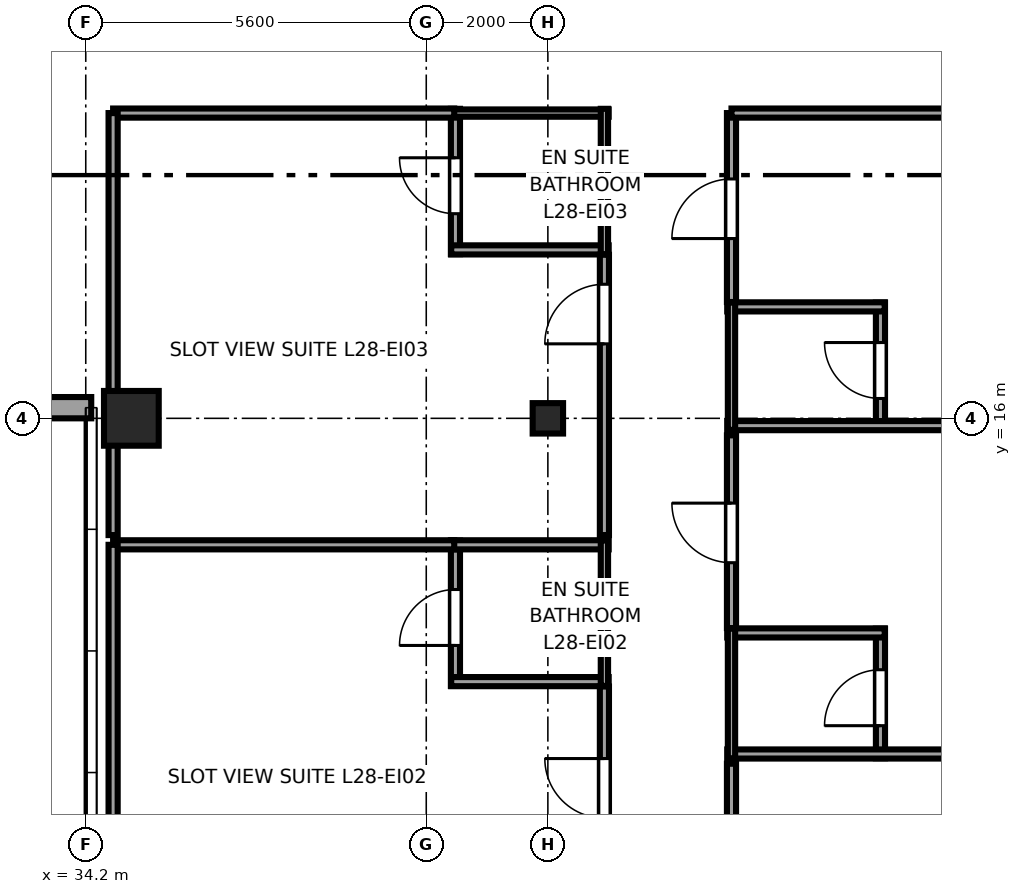
"""IFC4 building model, lengths in metres.
Left out: names, types, materials, properties, quantities, classifications, styles, units other than length and angle.
Written with IfcOpenShell. Run it as: python <this file> out.ifc"""

import sys

from ifc_helpers import new_model, si_unit, direction, frame, frame_2d, origin, origin_2d, place, context, subcontext, project, spatial, rectangle, i_section, extrude, source, transform, mapped, element, fill, save


model = new_model("IFC4")
c1 = context("Model", 3, precision=1e-05, world=origin(), true_north=direction((0.0, 1.0)))
c2 = subcontext(c1, "Body", "Model", "MODEL_VIEW")
j1 = project(units=[si_unit("LENGTHUNIT", "METRE"), si_unit("PLANEANGLEUNIT", "RADIAN")], contexts=[c1])
p1 = place(None, origin())
s1 = spatial("IfcSite", under=j1, at=p1, CompositionType="ELEMENT")
p2 = place(p1, origin())
s2 = spatial("IfcBuilding", under=s1, at=p2, CompositionType="ELEMENT")
p3 = place(p2, frame((0.0, 0.0, 111.55)))
s3 = spatial("IfcBuildingStorey", under=s2, at=p3, CompositionType="ELEMENT", Elevation=111.55)
m1 = source(origin(), c2, "Body", "SweptSolid", [
    extrude(rectangle(XDim=0.9, YDim=0.9, at=origin_2d()), origin(), (0.0, 0.0, 1.0), 3.55),
])
p4 = place(p3, frame((34.95, 16.0, 0.0), z_axis=(0.0, 0.0, 1.0), x_axis=(1.0, 0.0, 0.0)))
e1 = element("IfcColumn", 1, at=p4, inside=s3, PredefinedType="COLUMN", context=c2, shape_type="MappedRepresentation", body=[
    mapped(m1, transform((0.0, 0.0, 0.0), x_axis=(1.0, 0.0, 0.0), y_axis=(0.0, 1.0, 0.0), z_axis=(0.0, 0.0, 1.0), scale=1.0)),
])
m2 = source(origin(), c2, "Body", "SweptSolid", [
    extrude(i_section(OverallWidth=0.5, OverallDepth=0.5, WebThickness=0.022, FlangeThickness=0.034, at=origin_2d()), origin(), (0.0, 0.0, 1.0), 3.55),
])
p5 = place(p3, frame((41.8, 16.0, 0.0), z_axis=(0.0, 0.0, 1.0), x_axis=(1.0, 0.0, 0.0)))
e2 = element("IfcColumn", 2, at=p5, inside=s3, PredefinedType="COLUMN", context=c2, shape_type="MappedRepresentation", body=[
    mapped(m2, transform((0.0, 0.0, 0.0), x_axis=(1.0, 0.0, 0.0), y_axis=(0.0, 1.0, 0.0), z_axis=(0.0, 0.0, 1.0), scale=1.0)),
])
p6 = place(p3, frame((22.71, 16.175, 0.0), z_axis=(0.0, 0.0, 1.0), x_axis=(1.0, 0.0, 0.0)))
e3 = element("IfcWall", 3, at=p6, inside=s3, PredefinedType="SOLIDWALL", context=c2, shape_type="SweptSolid", body=[
    extrude(rectangle(XDim=11.58, YDim=0.35, at=frame_2d((5.79, 0.0))), origin(), (0.0, 0.0, 1.0), 2.748),
])
p7 = place(p6, frame((2.22, 0.0, 0.68)))
e4 = element("IfcOpeningElement", 4, at=p7, cuts=e3, PredefinedType="OPENING", context=c2, shape_type="SweptSolid", body=[
    extrude(rectangle(XDim=1.95, YDim=1.82, at=frame_2d((0.975, 0.91))), frame((0.0, 0.185, 0.0), z_axis=(0.0, -1.0, 0.0), x_axis=(1.0, 0.0, 0.0)), (0.0, 0.0, 1.0), 0.37),
])
p8 = place(p6, frame((7.41, 0.0, 0.68)))
e5 = element("IfcOpeningElement", 5, at=p8, cuts=e3, PredefinedType="OPENING", context=c2, shape_type="SweptSolid", body=[
    extrude(rectangle(XDim=1.95, YDim=1.82, at=frame_2d((0.975, 0.91))), frame((0.0, 0.185, 0.0), z_axis=(0.0, -1.0, 0.0), x_axis=(1.0, 0.0, 0.0)), (0.0, 0.0, 1.0), 0.37),
])
p9 = place(p3, frame((40.28, 11.6, 0.0), z_axis=(0.0, 0.0, 1.0), x_axis=(0.0, 1.0, 0.0)))
e6 = element("IfcWall", 6, at=p9, inside=s3, PredefinedType="PARTITIONING", context=c2, shape_type="SweptSolid", body=[
    extrude(rectangle(XDim=2.39, YDim=0.15, at=frame_2d((1.195, 0.0))), origin(), (0.0, 0.0, 1.0), 3.37),
])
p10 = place(p9, frame((0.665, 0.0, 0.0)))
e7 = element("IfcOpeningElement", 7, at=p10, cuts=e6, PredefinedType="OPENING", context=c2, shape_type="SweptSolid", body=[
    extrude(rectangle(XDim=0.92, YDim=2.01, at=frame_2d((0.46, 1.005))), frame((0.0, 0.085, 0.0), z_axis=(0.0, -1.0, 0.0), x_axis=(1.0, 0.0, 0.0)), (0.0, 0.0, 1.0), 0.17),
])
for number, where, z_axis, x_axis in (
    (8, (40.21, 11.67, 0.0), (0.0, 0.0, 1.0), (1.0, 0.0, 0.0)),
    (9, (40.21, 13.92, 0.0), (0.0, 0.0, 1.0), (1.0, 0.0, 0.0)),
):
    element("IfcWall", number, at=place(p3, frame(where, z_axis=z_axis, x_axis=x_axis)), inside=s3, PredefinedType="PARTITIONING", context=c2, shape_type="SweptSolid", body=[
        extrude(rectangle(XDim=2.59, YDim=0.15, at=frame_2d((1.295, 0.0))), origin(), (0.0, 0.0, 1.0), 3.37),
    ])
p11 = place(p3, frame((42.73, 11.6, 0.0), z_axis=(0.0, 0.0, 1.0), x_axis=(0.0, 1.0, 0.0)))
e10 = element("IfcWall", 10, at=p11, inside=s3, PredefinedType="PLUMBINGWALL", context=c2, shape_type="SweptSolid", body=[
    extrude(rectangle(XDim=2.39, YDim=0.12, at=frame_2d((1.195, 0.0))), origin(), (0.0, 0.0, 1.0), 3.37),
])
p12 = place(p3, frame((40.28, 18.7, 0.0), z_axis=(0.0, 0.0, 1.0), x_axis=(0.0, 1.0, 0.0)))
e11 = element("IfcWall", 11, at=p12, inside=s3, PredefinedType="PARTITIONING", context=c2, shape_type="SweptSolid", body=[
    extrude(rectangle(XDim=2.39, YDim=0.15, at=frame_2d((1.195, 0.0))), origin(), (0.0, 0.0, 1.0), 3.37),
])
p13 = place(p12, frame((0.665, 0.0, 0.0)))
e12 = element("IfcOpeningElement", 12, at=p13, cuts=e11, PredefinedType="OPENING", context=c2, shape_type="SweptSolid", body=[
    extrude(rectangle(XDim=0.92, YDim=2.01, at=frame_2d((0.46, 1.005))), frame((0.0, 0.085, 0.0), z_axis=(0.0, -1.0, 0.0), x_axis=(1.0, 0.0, 0.0)), (0.0, 0.0, 1.0), 0.17),
])
p14 = place(p3, frame((40.21, 18.77, 0.0), z_axis=(0.0, 0.0, 1.0), x_axis=(1.0, 0.0, 0.0)))
e13 = element("IfcWall", 13, at=p14, inside=s3, PredefinedType="PARTITIONING", context=c2, shape_type="SweptSolid", body=[
    extrude(rectangle(XDim=2.59, YDim=0.15, at=frame_2d((1.295, 0.0))), origin(), (0.0, 0.0, 1.0), 3.37),
])
p15 = place(p3, frame((40.21, 21.02, 0.0), z_axis=(0.0, 0.0, 1.0), x_axis=(1.0, 0.0, 0.0)))
e14 = element("IfcWall", 14, at=p15, inside=s3, PredefinedType="PLUMBINGWALL", context=c2, shape_type="SweptSolid", body=[
    extrude(rectangle(XDim=2.59, YDim=0.12, at=frame_2d((1.295, 0.0))), origin(), (0.0, 0.0, 1.0), 3.37),
])
p16 = place(p3, frame((42.73, 18.7, 0.0), z_axis=(0.0, 0.0, 1.0), x_axis=(0.0, 1.0, 0.0)))
e15 = element("IfcWall", 15, at=p16, inside=s3, PredefinedType="PLUMBINGWALL", context=c2, shape_type="SweptSolid", body=[
    extrude(rectangle(XDim=2.39, YDim=0.12, at=frame_2d((1.195, 0.0))), origin(), (0.0, 0.0, 1.0), 3.37),
])
p17 = place(p3, frame((47.27, 10.41, 0.0), z_axis=(0.0, 0.0, 1.0), x_axis=(0.0, 1.0, 0.0)))
e16 = element("IfcWall", 16, at=p17, inside=s3, PredefinedType="PARTITIONING", context=c2, shape_type="SweptSolid", body=[
    extrude(rectangle(XDim=2.131, YDim=0.15, at=frame_2d((1.065, 0.0))), origin(), (0.0, 0.0, 1.0), 3.37),
])
p18 = place(p17, frame((0.535, 0.0, 0.0)))
e17 = element("IfcOpeningElement", 17, at=p18, cuts=e16, PredefinedType="OPENING", context=c2, shape_type="SweptSolid", body=[
    extrude(rectangle(XDim=0.92, YDim=2.01, at=frame_2d((0.46, 1.005))), frame((0.0, 0.085, 0.0), z_axis=(0.0, -1.0, 0.0), x_axis=(1.0, 0.0, 0.0)), (0.0, 0.0, 1.0), 0.17),
])
p19 = place(p3, frame((44.75, 10.48, 0.0), z_axis=(0.0, 0.0, 1.0), x_axis=(1.0, 0.0, 0.0)))
e18 = element("IfcWall", 18, at=p19, inside=s3, PredefinedType="PARTITIONING", context=c2, shape_type="SweptSolid", body=[
    extrude(rectangle(XDim=11.845, YDim=0.15, at=frame_2d((5.922, 0.0))), origin(), (0.0, 0.0, 1.0), 3.37),
])
p20 = place(p3, frame((44.75, 12.471, 0.0), z_axis=(0.0, 0.0, 1.0), x_axis=(1.0, 0.0, 0.0)))
e19 = element("IfcWall", 19, at=p20, inside=s3, PredefinedType="PARTITIONING", context=c2, shape_type="SweptSolid", body=[
    extrude(rectangle(XDim=2.59, YDim=0.15, at=frame_2d((1.295, 0.0))), origin(), (0.0, 0.0, 1.0), 3.37),
])
p21 = place(p3, frame((44.82, 10.41, 0.0), z_axis=(0.0, 0.0, 1.0), x_axis=(0.0, 1.0, 0.0)))
e20 = element("IfcWall", 20, at=p21, inside=s3, PredefinedType="PLUMBINGWALL", context=c2, shape_type="SweptSolid", body=[
    extrude(rectangle(XDim=2.131, YDim=0.12, at=frame_2d((1.065, 0.0))), origin(), (0.0, 0.0, 1.0), 3.37),
])
p22 = place(p3, frame((47.27, 15.81, 0.0), z_axis=(0.0, 0.0, 1.0), x_axis=(0.0, 1.0, 0.0)))
e21 = element("IfcWall", 21, at=p22, inside=s3, PredefinedType="PARTITIONING", context=c2, shape_type="SweptSolid", body=[
    extrude(rectangle(XDim=2.093, YDim=0.15, at=frame_2d((1.046, 0.0))), origin(), (0.0, 0.0, 1.0), 3.37),
])
p23 = place(p22, frame((0.517, 0.0, 0.0)))
e22 = element("IfcOpeningElement", 22, at=p23, cuts=e21, PredefinedType="OPENING", context=c2, shape_type="SweptSolid", body=[
    extrude(rectangle(XDim=0.92, YDim=2.01, at=frame_2d((0.46, 1.005))), frame((0.0, 0.085, 0.0), z_axis=(0.0, -1.0, 0.0), x_axis=(1.0, 0.0, 0.0)), (0.0, 0.0, 1.0), 0.17),
])
p24 = place(p3, frame((44.75, 15.88, 0.0), z_axis=(0.0, 0.0, 1.0), x_axis=(1.0, 0.0, 0.0)))
e23 = element("IfcWall", 23, at=p24, inside=s3, PredefinedType="PARTITIONING", context=c2, shape_type="SweptSolid", body=[
    extrude(rectangle(XDim=11.845, YDim=0.15, at=frame_2d((5.922, 0.0))), origin(), (0.0, 0.0, 1.0), 2.748),
])
p25 = place(p3, frame((44.75, 17.833, 0.0), z_axis=(0.0, 0.0, 1.0), x_axis=(1.0, 0.0, 0.0)))
e24 = element("IfcWall", 24, at=p25, inside=s3, PredefinedType="PARTITIONING", context=c2, shape_type="SweptSolid", body=[
    extrude(rectangle(XDim=2.59, YDim=0.15, at=frame_2d((1.295, 0.0))), origin(), (0.0, 0.0, 1.0), 3.37),
])
p26 = place(p3, frame((44.82, 15.81, 0.0), z_axis=(0.0, 0.0, 1.0), x_axis=(0.0, 1.0, 0.0)))
e25 = element("IfcWall", 25, at=p26, inside=s3, PredefinedType="PLUMBINGWALL", context=c2, shape_type="SweptSolid", body=[
    extrude(rectangle(XDim=2.093, YDim=0.12, at=frame_2d((1.046, 0.0))), origin(), (0.0, 0.0, 1.0), 3.37),
])
p27 = place(p3, frame((42.73, 7.08, 0.0), z_axis=(0.0, 0.0, 1.0), x_axis=(0.0, 1.0, 0.0)))
e26 = element("IfcWall", 26, at=p27, inside=s3, PredefinedType="PARTITIONING", context=c2, shape_type="SweptSolid", body=[
    extrude(rectangle(XDim=4.51, YDim=0.15, at=frame_2d((2.255, 0.0))), origin(), (0.0, 0.0, 1.0), 3.37),
])
p28 = place(p27, frame((2.345, 0.0, 0.0)))
e27 = element("IfcOpeningElement", 27, at=p28, cuts=e26, PredefinedType="OPENING", context=c2, shape_type="SweptSolid", body=[
    extrude(rectangle(XDim=0.98, YDim=2.12, at=frame_2d((0.49, 1.06))), frame((0.0, 0.085, 0.0), z_axis=(0.0, -1.0, 0.0), x_axis=(1.0, 0.0, 0.0)), (0.0, 0.0, 1.0), 0.17),
])
p29 = place(p3, frame((34.65, 13.92, 0.0), z_axis=(0.0, 0.0, 1.0), x_axis=(1.0, 0.0, 0.0)))
e28 = element("IfcWall", 28, at=p29, inside=s3, PredefinedType="PARTITIONING", context=c2, shape_type="SweptSolid", body=[
    extrude(rectangle(XDim=5.61, YDim=0.15, at=frame_2d((2.805, 0.0))), origin(), (0.0, 0.0, 1.0), 3.37),
])
p30 = place(p3, frame((34.65, 7.08, 0.0), z_axis=(0.0, 0.0, 1.0), x_axis=(0.0, 1.0, 0.0)))
e29 = element("IfcWall", 29, at=p30, inside=s3, PredefinedType="PARTITIONING", context=c2, shape_type="SweptSolid", body=[
    extrude(rectangle(XDim=6.84, YDim=0.15, at=frame_2d((3.42, 0.0))), origin(), (0.0, 0.0, 1.0), 3.37),
])
p31 = place(p3, frame((42.73, 14.08, 0.0), z_axis=(0.0, 0.0, 1.0), x_axis=(0.0, 1.0, 0.0)))
e30 = element("IfcWall", 30, at=p31, inside=s3, PredefinedType="PARTITIONING", context=c2, shape_type="SweptSolid", body=[
    extrude(rectangle(XDim=4.61, YDim=0.15, at=frame_2d((2.305, 0.0))), origin(), (0.0, 0.0, 1.0), 3.37),
])
p32 = place(p31, frame((3.145, 0.0, 0.0)))
e31 = element("IfcOpeningElement", 31, at=p32, cuts=e30, PredefinedType="OPENING", context=c2, shape_type="SweptSolid", body=[
    extrude(rectangle(XDim=0.98, YDim=2.12, at=frame_2d((0.49, 1.06))), frame((0.0, 0.085, 0.0), z_axis=(0.0, -1.0, 0.0), x_axis=(1.0, 0.0, 0.0)), (0.0, 0.0, 1.0), 0.17),
])
p33 = place(p3, frame((34.65, 21.02, 0.0), z_axis=(0.0, 0.0, 1.0), x_axis=(1.0, 0.0, 0.0)))
e32 = element("IfcWall", 32, at=p33, inside=s3, PredefinedType="PARTITIONING", context=c2, shape_type="SweptSolid", body=[
    extrude(rectangle(XDim=5.61, YDim=0.15, at=frame_2d((2.805, 0.0))), origin(), (0.0, 0.0, 1.0), 3.37),
])
p34 = place(p3, frame((34.65, 14.08, 0.0), z_axis=(0.0, 0.0, 1.0), x_axis=(0.0, 1.0, 0.0)))
e33 = element("IfcWall", 33, at=p34, inside=s3, PredefinedType="PARTITIONING", context=c2, shape_type="SweptSolid", body=[
    extrude(rectangle(XDim=6.94, YDim=0.15, at=frame_2d((3.47, 0.0))), origin(), (0.0, 0.0, 1.0), 3.37),
])
p35 = place(p3, frame((44.82, 7.151, 0.0), z_axis=(0.0, 0.0, 1.0), x_axis=(0.0, 1.0, 0.0)))
e34 = element("IfcWall", 34, at=p35, inside=s3, PredefinedType="PARTITIONING", context=c2, shape_type="SweptSolid", body=[
    extrude(rectangle(XDim=3.169, YDim=0.15, at=frame_2d((1.584, 0.0))), origin(), (0.0, 0.0, 1.0), 3.37),
])
p36 = place(p35, frame((1.074, 0.0, 0.0)))
e35 = element("IfcOpeningElement", 35, at=p36, cuts=e34, PredefinedType="OPENING", context=c2, shape_type="SweptSolid", body=[
    extrude(rectangle(XDim=0.98, YDim=2.12, at=frame_2d((0.49, 1.06))), frame((0.0, 0.085, 0.0), z_axis=(0.0, -1.0, 0.0), x_axis=(1.0, 0.0, 0.0)), (0.0, 0.0, 1.0), 0.17),
])
p37 = place(p3, frame((44.82, 12.551, 0.0), z_axis=(0.0, 0.0, 1.0), x_axis=(0.0, 1.0, 0.0)))
e36 = element("IfcWall", 36, at=p37, inside=s3, PredefinedType="PARTITIONING", context=c2, shape_type="SweptSolid", body=[
    extrude(rectangle(XDim=3.169, YDim=0.15, at=frame_2d((1.584, 0.0))), origin(), (0.0, 0.0, 1.0), 3.37),
])
p38 = place(p37, frame((1.074, 0.0, 0.0)))
e37 = element("IfcOpeningElement", 37, at=p38, cuts=e36, PredefinedType="OPENING", context=c2, shape_type="SweptSolid", body=[
    extrude(rectangle(XDim=0.98, YDim=2.12, at=frame_2d((0.49, 1.06))), frame((0.0, 0.085, 0.0), z_axis=(0.0, -1.0, 0.0), x_axis=(1.0, 0.0, 0.0)), (0.0, 0.0, 1.0), 0.17),
])
p39 = place(p3, frame((44.82, 17.913, 0.0), z_axis=(0.0, 0.0, 1.0), x_axis=(0.0, 1.0, 0.0)))
e38 = element("IfcWall", 38, at=p39, inside=s3, PredefinedType="PARTITIONING", context=c2, shape_type="SweptSolid", body=[
    extrude(rectangle(XDim=3.107, YDim=0.15, at=frame_2d((1.553, 0.0))), origin(), (0.0, 0.0, 1.0), 3.37),
])
p40 = place(p39, frame((1.043, 0.0, 0.0)))
e39 = element("IfcOpeningElement", 39, at=p40, cuts=e38, PredefinedType="OPENING", context=c2, shape_type="SweptSolid", body=[
    extrude(rectangle(XDim=0.98, YDim=2.12, at=frame_2d((0.49, 1.06))), frame((0.0, 0.085, 0.0), z_axis=(0.0, -1.0, 0.0), x_axis=(1.0, 0.0, 0.0)), (0.0, 0.0, 1.0), 0.17),
])
p41 = place(p3, frame((44.82, 21.02, 0.0), z_axis=(0.0, 0.0, 1.0), x_axis=(1.0, 0.0, 0.0)))
e40 = element("IfcWall", 40, at=p41, inside=s3, PredefinedType="PARTITIONING", context=c2, shape_type="SweptSolid", body=[
    extrude(rectangle(XDim=11.775, YDim=0.15, at=frame_2d((5.887, 0.0))), origin(), (0.0, 0.0, 1.0), 3.37),
])
m3 = source(origin(), c2, "Body", "SweptSolid", [
    extrude(rectangle(XDim=0.92, YDim=2.01, at=frame_2d((0.46, 1.005))), frame((0.0, 0.025, 0.0), z_axis=(0.0, -1.0, 0.0), x_axis=(1.0, 0.0, 0.0)), (0.0, 0.0, 1.0), 0.05),
])
p42 = place(p10, origin())
e41 = element("IfcDoor", 41, at=p42, inside=s3, OperationType="SINGLE_SWING_LEFT", PredefinedType="DOOR", context=c2, shape_type="MappedRepresentation", body=[
    mapped(m3, transform((0.0, 0.0, 0.0), x_axis=(1.0, 0.0, 0.0), y_axis=(0.0, 1.0, 0.0), z_axis=(0.0, 0.0, 1.0), scale=1.0)),
])
fill(e7, e41)
p43 = place(p13, origin())
e42 = element("IfcDoor", 42, at=p43, inside=s3, OperationType="SINGLE_SWING_RIGHT", PredefinedType="DOOR", context=c2, shape_type="MappedRepresentation", body=[
    mapped(m3, transform((0.0, 0.0, 0.0), x_axis=(1.0, 0.0, 0.0), y_axis=(0.0, 1.0, 0.0), z_axis=(0.0, 0.0, 1.0), scale=1.0)),
])
fill(e12, e42)
p44 = place(p18, origin())
e43 = element("IfcDoor", 43, at=p44, inside=s3, OperationType="SINGLE_SWING_LEFT", PredefinedType="DOOR", context=c2, shape_type="MappedRepresentation", body=[
    mapped(m3, transform((0.0, 0.0, 0.0), x_axis=(1.0, 0.0, 0.0), y_axis=(0.0, 1.0, 0.0), z_axis=(0.0, 0.0, 1.0), scale=1.0)),
])
fill(e17, e43)
p45 = place(p23, origin())
e44 = element("IfcDoor", 44, at=p45, inside=s3, OperationType="SINGLE_SWING_RIGHT", PredefinedType="DOOR", context=c2, shape_type="MappedRepresentation", body=[
    mapped(m3, transform((0.0, 0.0, 0.0), x_axis=(1.0, 0.0, 0.0), y_axis=(0.0, 1.0, 0.0), z_axis=(0.0, 0.0, 1.0), scale=1.0)),
])
fill(e22, e44)
m4 = source(origin(), c2, "Body", "SweptSolid", [
    extrude(rectangle(XDim=0.98, YDim=2.12, at=frame_2d((0.49, 1.06))), frame((0.0, 0.025, 0.0), z_axis=(0.0, -1.0, 0.0), x_axis=(1.0, 0.0, 0.0)), (0.0, 0.0, 1.0), 0.05),
])
p46 = place(p28, origin())
e45 = element("IfcDoor", 45, at=p46, inside=s3, OperationType="SINGLE_SWING_RIGHT", PredefinedType="DOOR", context=c2, shape_type="MappedRepresentation", body=[
    mapped(m4, transform((0.0, 0.0, 0.0), x_axis=(1.0, 0.0, 0.0), y_axis=(0.0, 1.0, 0.0), z_axis=(0.0, 0.0, 1.0), scale=1.0)),
])
fill(e27, e45)
p47 = place(p32, origin())
e46 = element("IfcDoor", 46, at=p47, inside=s3, OperationType="SINGLE_SWING_LEFT", PredefinedType="DOOR", context=c2, shape_type="MappedRepresentation", body=[
    mapped(m4, transform((0.0, 0.0, 0.0), x_axis=(1.0, 0.0, 0.0), y_axis=(0.0, 1.0, 0.0), z_axis=(0.0, 0.0, 1.0), scale=1.0)),
])
fill(e31, e46)
p48 = place(p38, origin())
e47 = element("IfcDoor", 47, at=p48, inside=s3, OperationType="SINGLE_SWING_RIGHT", PredefinedType="DOOR", context=c2, shape_type="MappedRepresentation", body=[
    mapped(m4, transform((0.0, 0.0, 0.0), x_axis=(1.0, 0.0, 0.0), y_axis=(0.0, 1.0, 0.0), z_axis=(0.0, 0.0, 1.0), scale=1.0)),
])
fill(e37, e47)
p49 = place(p40, origin())
e48 = element("IfcDoor", 48, at=p49, inside=s3, OperationType="SINGLE_SWING_LEFT", PredefinedType="DOOR", context=c2, shape_type="MappedRepresentation", body=[
    mapped(m4, transform((0.0, 0.0, 0.0), x_axis=(1.0, 0.0, 0.0), y_axis=(0.0, 1.0, 0.0), z_axis=(0.0, 0.0, 1.0), scale=1.0)),
])
fill(e39, e48)
save(model, sys.argv[1])
